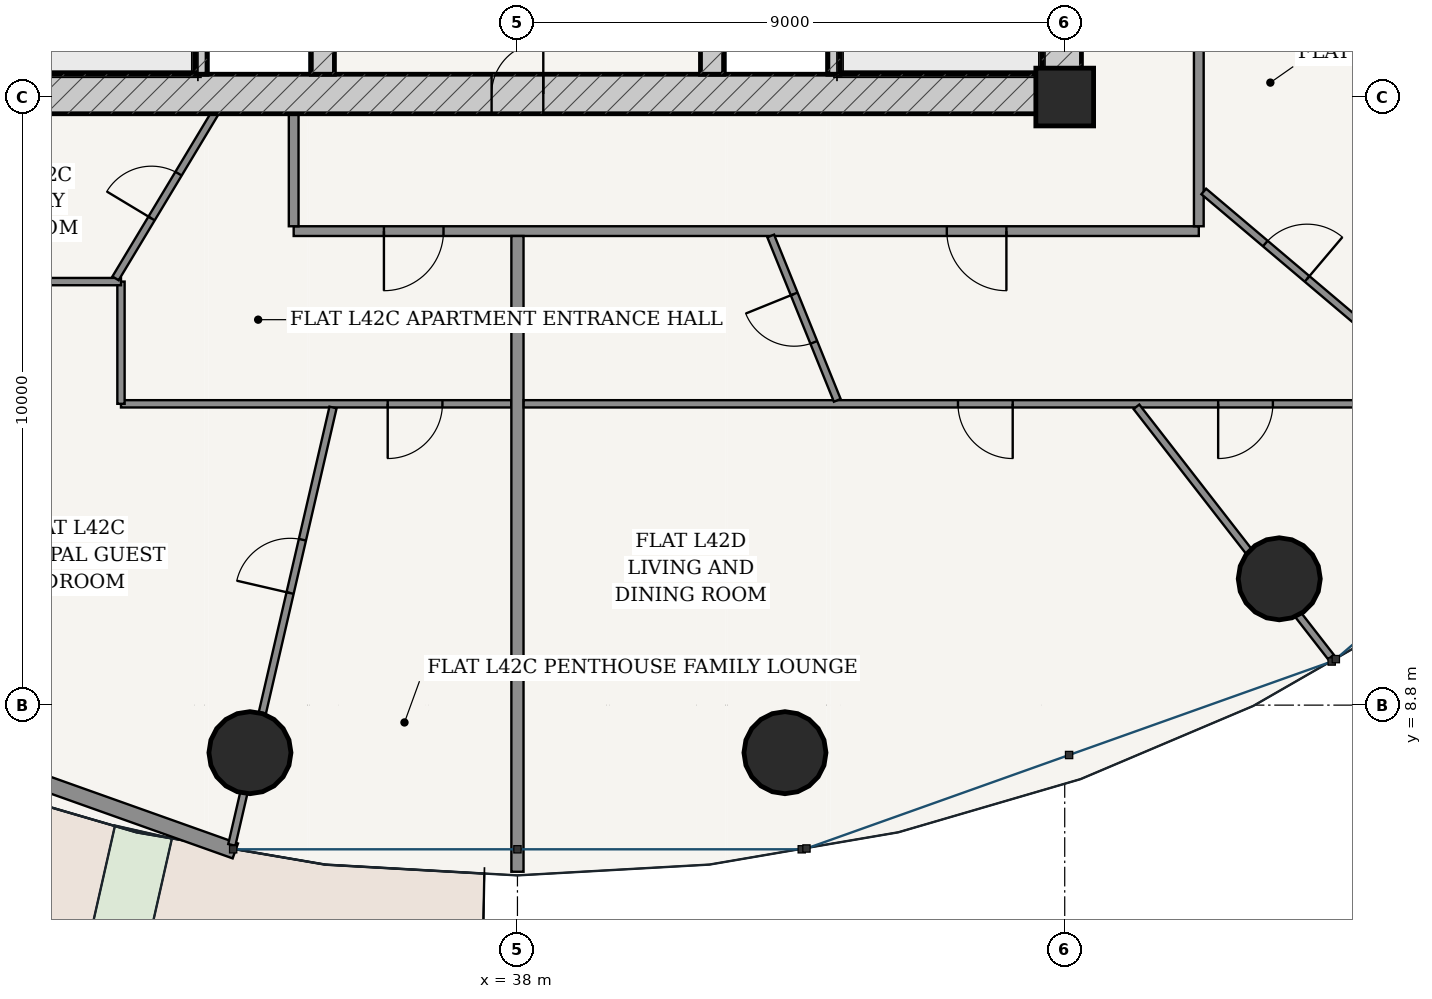
"""IFC4 building model, lengths in metres.
Left out: names, types, materials, properties, quantities, classifications, styles, units other than length and angle.
Written with IfcOpenShell. Run it as: python <this file> out.ifc"""

import sys

from ifc_helpers import new_model, si_unit, direction, frame, frame_2d, origin, origin_2d, place, context, subcontext, project, spatial, rectangle, hollow_circle, extrude, source, transform, mapped, element, fill, save


model = new_model("IFC4")
c1 = context("Model", 3, precision=1e-05, world=origin(), true_north=direction((-0.2419218956, 0.970295726276)))
c2 = subcontext(c1, "Body", "Model", "MODEL_VIEW")
j1 = project(units=[si_unit("LENGTHUNIT", "METRE"), si_unit("PLANEANGLEUNIT", "RADIAN")], contexts=[c1])
p1 = place(None, origin())
s1 = spatial("IfcSite", under=j1, at=p1, CompositionType="ELEMENT")
p2 = place(p1, origin())
s2 = spatial("IfcBuilding", under=s1, at=p2, CompositionType="ELEMENT")
p3 = place(p2, frame((0.0, 0.0, 160.6)))
s3 = spatial("IfcBuildingStorey", under=s2, at=p3, CompositionType="ELEMENT", Elevation=160.6)
p4 = place(p3, frame((47.0, 18.8, 0.0), z_axis=(0.0, 0.0, 1.0), x_axis=(1.0, 0.0, 0.0)))
e1 = element("IfcColumn", 1, at=p4, inside=s3, PredefinedType="COLUMN", context=c2, shape_type="SweptSolid", body=[
    extrude(rectangle(XDim=0.95, YDim=0.95, at=origin_2d()), origin(), (0.0, 0.0, 1.0), 3.6),
])
p5 = place(p3, frame((28.725, 18.85, 0.0), z_axis=(0.0, 0.0, 1.0), x_axis=(1.0, 0.0, 0.0)))
e2 = element("IfcWall", 2, at=p5, inside=s3, PredefinedType="SHEAR", context=c2, shape_type="SweptSolid", body=[
    extrude(rectangle(XDim=18.55, YDim=0.65, at=frame_2d((9.275, 0.0))), origin(), (0.0, 0.0, 1.0), 3.33),
])
p6 = place(p5, frame((8.85, 0.0, 0.0)))
e3 = element("IfcOpeningElement", 3, at=p6, cuts=e2, PredefinedType="OPENING", context=c2, shape_type="SweptSolid", body=[
    extrude(rectangle(XDim=0.85, YDim=2.1, at=frame_2d((0.425, 1.05))), frame((0.0, 0.335, 0.0), z_axis=(0.0, -1.0, 0.0), x_axis=(1.0, 0.0, 0.0)), (0.0, 0.0, 1.0), 0.67),
])
p7 = place(p3, frame((46.95, 19.175, 0.0), z_axis=(0.0, 0.0, 1.0), x_axis=(0.0, 1.0, 0.0)))
e4 = element("IfcWall", 4, at=p7, inside=s3, PredefinedType="SHEAR", context=c2, shape_type="SweptSolid", body=[
    extrude(rectangle(XDim=15.25, YDim=0.65, at=frame_2d((7.625, 0.0))), origin(), (0.0, 0.0, 1.0), 3.33),
])
p8 = place(p7, frame((9.875, 0.0, 0.0)))
e5 = element("IfcOpeningElement", 5, at=p8, cuts=e4, PredefinedType="OPENING", context=c2, shape_type="SweptSolid", body=[
    extrude(rectangle(XDim=1.5, YDim=2.2, at=frame_2d((0.75, 1.1))), frame((0.0, 0.335, 0.0), z_axis=(0.0, -1.0, 0.0), x_axis=(1.0, 0.0, 0.0)), (0.0, 0.0, 1.0), 0.67),
])
for number, where, z_axis, x_axis in (
    (6, (32.795, 19.175, 0.0), (0.0, 0.0, 1.0), (0.0, 1.0, 0.0)),
    (7, (43.205, 19.175, 0.0), (0.0, 0.0, 1.0), (0.0, 1.0, 0.0)),
):
    element("IfcWall", number, at=place(p3, frame(where, z_axis=z_axis, x_axis=x_axis)), inside=s3, PredefinedType="SOLIDWALL", context=c2, shape_type="SweptSolid", body=[
        extrude(rectangle(XDim=7.375, YDim=0.2, at=frame_2d((3.688, 0.0))), origin(), (0.0, 0.0, 1.0), 3.33),
    ])
p9 = place(p3, frame((34.8, 19.175, 0.0), z_axis=(0.0, 0.0, 1.0), x_axis=(0.0, 1.0, 0.0)))
e8 = element("IfcWall", 8, at=p9, inside=s3, PredefinedType="SHEAR", context=c2, shape_type="SweptSolid", body=[
    extrude(rectangle(XDim=15.25, YDim=0.38, at=frame_2d((7.625, 0.0))), origin(), (0.0, 0.0, 1.0), 3.33),
])
p10 = place(p9, frame((7.8, 0.0, 0.0)))
e9 = element("IfcOpeningElement", 9, at=p10, cuts=e8, PredefinedType="OPENING", context=c2, shape_type="SweptSolid", body=[
    extrude(rectangle(XDim=1.05, YDim=2.15, at=frame_2d((0.525, 1.075))), frame((0.0, 0.2, 0.0), z_axis=(0.0, -1.0, 0.0), x_axis=(1.0, 0.0, 0.0)), (0.0, 0.0, 1.0), 0.4),
])
p11 = place(p3, frame((41.2, 19.175, 0.0), z_axis=(0.0, 0.0, 1.0), x_axis=(0.0, 1.0, 0.0)))
e10 = element("IfcWall", 10, at=p11, inside=s3, PredefinedType="SHEAR", context=c2, shape_type="SweptSolid", body=[
    extrude(rectangle(XDim=15.25, YDim=0.38, at=frame_2d((7.625, 0.0))), origin(), (0.0, 0.0, 1.0), 3.33),
])
p12 = place(p11, frame((7.8, 0.0, 0.0)))
e11 = element("IfcOpeningElement", 11, at=p12, cuts=e10, PredefinedType="OPENING", context=c2, shape_type="SweptSolid", body=[
    extrude(rectangle(XDim=1.05, YDim=2.15, at=frame_2d((0.525, 1.075))), frame((0.0, 0.2, 0.0), z_axis=(0.0, -1.0, 0.0), x_axis=(1.0, 0.0, 0.0)), (0.0, 0.0, 1.0), 0.4),
])
for number, where, z_axis, x_axis in (
    (12, (33.601, 8.018, 0.0), (0.0, 0.0, 1.0), (1.0, 0.0, 0.0)),
    (13, (42.399, 8.018, 0.0), (0.0, 0.0, 1.0), (1.0, 0.0, 0.0)),
    (14, (50.528, 10.877, 0.0), (0.0, 0.0, 1.0), (1.0, 0.0, 0.0)),
):
    element("IfcColumn", number, at=place(p3, frame(where, z_axis=z_axis, x_axis=x_axis)), inside=s3, PredefinedType="COLUMN", context=c2, shape_type="SweptSolid", body=[
        extrude(hollow_circle(Radius=0.675, WallThickness=0.042, at=origin_2d()), origin(), (0.0, 0.0, 1.0), 3.6),
    ])
p13 = place(p3, frame((24.497, 9.557, 0.0), z_axis=(0.0, 0.0, 1.0), x_axis=(0.942103604331, -0.335321932934, 0.0)))
e15 = element("IfcWall", 15, at=p13, inside=s3, PredefinedType="SOLIDWALL", context=c2, shape_type="SweptSolid", body=[
    extrude(rectangle(XDim=9.408, YDim=0.26, at=frame_2d((4.704, 0.0))), origin(), (0.0, 0.0, 1.0), 3.33),
])
p14 = place(p13, frame((4.029, 0.0, 0.0)))
e16 = element("IfcOpeningElement", 16, at=p14, cuts=e15, PredefinedType="OPENING", context=c2, shape_type="SweptSolid", body=[
    extrude(rectangle(XDim=1.35, YDim=2.2, at=frame_2d((0.675, 1.1))), frame((0.0, 0.14, 0.0), z_axis=(0.0, -1.0, 0.0), x_axis=(1.0, 0.0, 0.0)), (0.0, 0.0, 1.0), 0.28),
])
p15 = place(p3, frame((34.32, 16.595, 0.0), z_axis=(0.0, 0.0, 1.0), x_axis=(1.0, 0.0, 0.0)))
e17 = element("IfcWall", 17, at=p15, inside=s3, PredefinedType="PARTITIONING", context=c2, shape_type="SweptSolid", body=[
    extrude(rectangle(XDim=14.885, YDim=0.16, at=frame_2d((7.442, 0.0))), origin(), (0.0, 0.0, 1.0), 2.776),
])
p16 = place(p15, frame((1.484, 0.0, 0.0)))
e18 = element("IfcOpeningElement", 18, at=p16, cuts=e17, PredefinedType="OPENING", context=c2, shape_type="SweptSolid", body=[
    extrude(rectangle(XDim=0.98, YDim=2.2, at=frame_2d((0.49, 1.1))), frame((0.0, 0.09, 0.0), z_axis=(0.0, -1.0, 0.0), x_axis=(1.0, 0.0, 0.0)), (0.0, 0.0, 1.0), 0.18),
])
p17 = place(p15, frame((10.741, 0.0, 0.0)))
e19 = element("IfcOpeningElement", 19, at=p17, cuts=e17, PredefinedType="OPENING", context=c2, shape_type="SweptSolid", body=[
    extrude(rectangle(XDim=0.98, YDim=2.2, at=frame_2d((0.49, 1.1))), frame((0.0, 0.09, 0.0), z_axis=(0.0, -1.0, 0.0), x_axis=(1.0, 0.0, 0.0)), (0.0, 0.0, 1.0), 0.18),
])
p18 = place(p3, frame((34.32, 16.675, 0.0), z_axis=(0.0, 0.0, 1.0), x_axis=(0.0, 1.0, 0.0)))
e20 = element("IfcWall", 20, at=p18, inside=s3, PredefinedType="PARTITIONING", context=c2, shape_type="SweptSolid", body=[
    extrude(rectangle(XDim=1.85, YDim=0.16, at=frame_2d((0.925, 0.0))), origin(), (0.0, 0.0, 1.0), 3.33),
])
p19 = place(p3, frame((49.205, 16.675, 0.0), z_axis=(0.0, 0.0, 1.0), x_axis=(0.0, 1.0, 0.0)))
e21 = element("IfcWall", 21, at=p19, inside=s3, PredefinedType="PARTITIONING", context=c2, shape_type="SweptSolid", body=[
    extrude(rectangle(XDim=18.4, YDim=0.16, at=frame_2d((9.2, 0.0))), origin(), (0.0, 0.0, 1.0), 2.776),
])
p20 = place(p19, frame((15.326, 0.0, 0.0)))
e22 = element("IfcOpeningElement", 22, at=p20, cuts=e21, PredefinedType="OPENING", context=c2, shape_type="SweptSolid", body=[
    extrude(rectangle(XDim=0.98, YDim=2.2, at=frame_2d((0.49, 1.1))), frame((0.0, 0.09, 0.0), z_axis=(0.0, -1.0, 0.0), x_axis=(1.0, 0.0, 0.0)), (0.0, 0.0, 1.0), 0.18),
])
p21 = place(p3, frame((37.898, 13.755, 0.0), z_axis=(0.0, 0.0, 1.0), x_axis=(-1.0, 0.0, 0.0)))
e23 = element("IfcWall", 23, at=p21, inside=s3, PredefinedType="PARTITIONING", context=c2, shape_type="SweptSolid", body=[
    extrude(rectangle(XDim=6.418, YDim=0.12, at=frame_2d((3.209, 0.0))), origin(), (0.0, 0.0, 1.0), 2.776),
])
p22 = place(p21, frame((1.132, 0.0, 0.0)))
e24 = element("IfcOpeningElement", 24, at=p22, cuts=e23, PredefinedType="OPENING", context=c2, shape_type="SweptSolid", body=[
    extrude(rectangle(XDim=0.9, YDim=2.15, at=frame_2d((0.45, 1.075))), frame((0.0, 0.07, 0.0), z_axis=(0.0, -1.0, 0.0), x_axis=(1.0, 0.0, 0.0)), (0.0, 0.0, 1.0), 0.14),
])
p23 = place(p3, frame((31.48, 13.755, 0.0), z_axis=(0.0, 0.0, 1.0), x_axis=(0.0, 1.0, 0.0)))
e25 = element("IfcWall", 25, at=p23, inside=s3, PredefinedType="PARTITIONING", context=c2, shape_type="SweptSolid", body=[
    extrude(rectangle(XDim=2.01, YDim=0.12, at=frame_2d((1.005, 0.0))), origin(), (0.0, 0.0, 1.0), 3.005),
])
p24 = place(p3, frame((31.48, 15.765, 0.0), z_axis=(0.0, 0.0, 1.0), x_axis=(-1.0, 0.0, 0.0)))
e26 = element("IfcWall", 26, at=p24, inside=s3, PredefinedType="PARTITIONING", context=c2, shape_type="SweptSolid", body=[
    extrude(rectangle(XDim=5.515, YDim=0.12, at=frame_2d((2.757, 0.0))), origin(), (0.0, 0.0, 1.0), 2.776),
])
p25 = place(p3, frame((34.967, 13.695, 0.0), z_axis=(0.0, 0.0, 1.0), x_axis=(-0.225458405801, -0.974252794327, 0.0)))
e27 = element("IfcWall", 27, at=p25, inside=s3, PredefinedType="PARTITIONING", context=c2, shape_type="SweptSolid", body=[
    extrude(rectangle(XDim=7.383, YDim=0.12, at=frame_2d((3.691, 0.0))), origin(), (0.0, 0.0, 1.0), 2.776),
])
p26 = place(p25, frame((2.232, 0.0, 0.0)))
e28 = element("IfcOpeningElement", 28, at=p26, cuts=e27, PredefinedType="OPENING", context=c2, shape_type="SweptSolid", body=[
    extrude(rectangle(XDim=0.9, YDim=2.15, at=frame_2d((0.45, 1.075))), frame((0.0, 0.07, 0.0), z_axis=(0.0, -1.0, 0.0), x_axis=(1.0, 0.0, 0.0)), (0.0, 0.0, 1.0), 0.14),
])
p27 = place(p3, frame((33.02, 18.525, 0.0), z_axis=(0.0, 0.0, 1.0), x_axis=(-0.515677168, -0.856782970421, 0.0)))
e29 = element("IfcWall", 29, at=p27, inside=s3, PredefinedType="PARTITIONING", context=c2, shape_type="SweptSolid", body=[
    extrude(rectangle(XDim=3.159, YDim=0.12, at=frame_2d((1.58, 0.0))), origin(), (0.0, 0.0, 1.0), 3.33),
])
p28 = place(p27, frame((1.15, 0.0, 0.0)))
e30 = element("IfcOpeningElement", 30, at=p28, cuts=e29, PredefinedType="OPENING", context=c2, shape_type="SweptSolid", body=[
    extrude(rectangle(XDim=0.86, YDim=2.15, at=frame_2d((0.43, 1.075))), frame((0.0, 0.07, 0.0), z_axis=(0.0, -1.0, 0.0), x_axis=(1.0, 0.0, 0.0)), (0.0, 0.0, 1.0), 0.14),
])
p29 = place(p3, frame((38.0, 16.515, 0.0), z_axis=(0.0, 0.0, 1.0), x_axis=(0.0, -1.0, 0.0)))
e31 = element("IfcWall", 31, at=p29, inside=s3, PredefinedType="PARTITIONING", context=c2, shape_type="SweptSolid", body=[
    extrude(rectangle(XDim=10.455, YDim=0.2, at=frame_2d((5.228, 0.0))), origin(), (0.0, 0.0, 1.0), 2.846),
])
p30 = place(p3, frame((52.045, 13.755, 0.0), z_axis=(0.0, 0.0, 1.0), x_axis=(-1.0, 0.0, 0.0)))
e32 = element("IfcWall", 32, at=p30, inside=s3, PredefinedType="PARTITIONING", context=c2, shape_type="SweptSolid", body=[
    extrude(rectangle(XDim=13.943, YDim=0.12, at=frame_2d((6.971, 0.0))), origin(), (0.0, 0.0, 1.0), 2.776),
])
p31 = place(p30, frame((5.9, 0.0, 0.0)))
e33 = element("IfcOpeningElement", 33, at=p31, cuts=e32, PredefinedType="OPENING", context=c2, shape_type="SweptSolid", body=[
    extrude(rectangle(XDim=0.9, YDim=2.15, at=frame_2d((0.45, 1.075))), frame((0.0, 0.07, 0.0), z_axis=(0.0, -1.0, 0.0), x_axis=(1.0, 0.0, 0.0)), (0.0, 0.0, 1.0), 0.14),
])
p32 = place(p30, frame((1.622, 0.0, 0.0)))
e34 = element("IfcOpeningElement", 34, at=p32, cuts=e32, PredefinedType="OPENING", context=c2, shape_type="SweptSolid", body=[
    extrude(rectangle(XDim=0.9, YDim=2.15, at=frame_2d((0.45, 1.075))), frame((0.0, 0.07, 0.0), z_axis=(0.0, -1.0, 0.0), x_axis=(1.0, 0.0, 0.0)), (0.0, 0.0, 1.0), 0.14),
])
p33 = place(p3, frame((48.179, 13.706, 0.0), z_axis=(0.0, 0.0, 1.0), x_axis=(0.613759011764, -0.789493429662, 0.0)))
e35 = element("IfcWall", 35, at=p33, inside=s3, PredefinedType="PARTITIONING", context=c2, shape_type="SweptSolid", body=[
    extrude(rectangle(XDim=5.212, YDim=0.12, at=frame_2d((2.606, 0.0))), origin(), (0.0, 0.0, 1.0), 2.776),
])
p34 = place(p3, frame((42.165, 16.515, 0.0), z_axis=(0.0, 0.0, 1.0), x_axis=(0.375386324206, -0.926868441365, 0.0)))
e36 = element("IfcWall", 36, at=p34, inside=s3, PredefinedType="PARTITIONING", context=c2, shape_type="SweptSolid", body=[
    extrude(rectangle(XDim=2.916, YDim=0.12, at=frame_2d((1.458, 0.0))), origin(), (0.0, 0.0, 1.0), 3.005),
])
p35 = place(p34, frame((1.028, 0.0, 0.0)))
e37 = element("IfcOpeningElement", 37, at=p35, cuts=e36, PredefinedType="OPENING", context=c2, shape_type="SweptSolid", body=[
    extrude(rectangle(XDim=0.86, YDim=2.15, at=frame_2d((0.43, 1.075))), frame((0.0, 0.07, 0.0), z_axis=(0.0, -1.0, 0.0), x_axis=(1.0, 0.0, 0.0)), (0.0, 0.0, 1.0), 0.14),
])
p36 = place(p3, frame((49.287, 17.248, 0.0), z_axis=(0.0, 0.0, 1.0), x_axis=(0.763274158734, -0.646074731443, 0.0)))
e38 = element("IfcWall", 38, at=p36, inside=s3, PredefinedType="PARTITIONING", context=c2, shape_type="SweptSolid", body=[
    extrude(rectangle(XDim=3.552, YDim=0.12, at=frame_2d((1.776, 0.0))), origin(), (0.0, 0.0, 1.0), 3.005),
])
p37 = place(p36, frame((1.326, 0.0, 0.0)))
e39 = element("IfcOpeningElement", 39, at=p37, cuts=e38, PredefinedType="OPENING", context=c2, shape_type="SweptSolid", body=[
    extrude(rectangle(XDim=0.9, YDim=2.15, at=frame_2d((0.45, 1.075))), frame((0.0, 0.07, 0.0), z_axis=(0.0, -1.0, 0.0), x_axis=(1.0, 0.0, 0.0)), (0.0, 0.0, 1.0), 0.14),
])
m1 = source(origin(), c2, "Body", "SweptSolid", [
    extrude(rectangle(XDim=0.85, YDim=2.1, at=frame_2d((0.425, 1.05))), frame((0.0, 0.025, 0.0), z_axis=(0.0, -1.0, 0.0), x_axis=(1.0, 0.0, 0.0)), (0.0, 0.0, 1.0), 0.05),
])
p38 = place(p6, origin())
e40 = element("IfcDoor", 40, at=p38, inside=s3, OperationType="SINGLE_SWING_RIGHT", PredefinedType="DOOR", context=c2, shape_type="MappedRepresentation", body=[
    mapped(m1, transform((0.0, 0.0, 0.0), scale=1.0)),
])
fill(e3, e40)
m2 = source(origin(), c2, "Body", "SweptSolid", [
    extrude(rectangle(XDim=0.98, YDim=2.2, at=frame_2d((0.49, 1.1))), frame((0.0, 0.025, 0.0), z_axis=(0.0, -1.0, 0.0), x_axis=(1.0, 0.0, 0.0)), (0.0, 0.0, 1.0), 0.05),
])
p39 = place(p16, frame((0.98, 0.0, 0.0), z_axis=(0.0, 0.0, 1.0), x_axis=(-1.0, 0.0, 0.0)))
e41 = element("IfcDoor", 41, at=p39, inside=s3, OperationType="SINGLE_SWING_RIGHT", PredefinedType="DOOR", context=c2, shape_type="MappedRepresentation", body=[
    mapped(m2, transform((0.0, 0.0, 0.0), scale=1.0)),
])
fill(e18, e41)
m3 = source(origin(), c2, "Body", "SweptSolid", [
    extrude(rectangle(XDim=0.86, YDim=2.15, at=frame_2d((0.43, 1.075))), frame((0.0, 0.025, 0.0), z_axis=(0.0, -1.0, 0.0), x_axis=(1.0, 0.0, 0.0)), (0.0, 0.0, 1.0), 0.05),
])
p40 = place(p28, frame((0.86, 0.0, 0.0), z_axis=(0.0, 0.0, 1.0), x_axis=(-1.0, 0.0, 0.0)))
e42 = element("IfcDoor", 42, at=p40, inside=s3, OperationType="SINGLE_SWING_LEFT", PredefinedType="DOOR", context=c2, shape_type="MappedRepresentation", body=[
    mapped(m3, transform((0.0, 0.0, 0.0), scale=1.0)),
])
fill(e30, e42)
m4 = source(origin(), c2, "Body", "SweptSolid", [
    extrude(rectangle(XDim=0.9, YDim=2.15, at=frame_2d((0.45, 1.075))), frame((0.0, 0.025, 0.0), z_axis=(0.0, -1.0, 0.0), x_axis=(1.0, 0.0, 0.0)), (0.0, 0.0, 1.0), 0.05),
])
p41 = place(p22, origin())
e43 = element("IfcDoor", 43, at=p41, inside=s3, OperationType="SINGLE_SWING_RIGHT", PredefinedType="DOOR", context=c2, shape_type="MappedRepresentation", body=[
    mapped(m4, transform((0.0, 0.0, 0.0), scale=1.0)),
])
fill(e24, e43)
p42 = place(p26, frame((0.9, 0.0, 0.0), z_axis=(0.0, 0.0, 1.0), x_axis=(-1.0, 0.0, 0.0)))
e44 = element("IfcDoor", 44, at=p42, inside=s3, OperationType="SINGLE_SWING_LEFT", PredefinedType="DOOR", context=c2, shape_type="MappedRepresentation", body=[
    mapped(m4, transform((0.0, 0.0, 0.0), scale=1.0)),
])
fill(e28, e44)
p43 = place(p17, frame((0.98, 0.0, 0.0), z_axis=(0.0, 0.0, 1.0), x_axis=(-1.0, 0.0, 0.0)))
e45 = element("IfcDoor", 45, at=p43, inside=s3, OperationType="SINGLE_SWING_LEFT", PredefinedType="DOOR", context=c2, shape_type="MappedRepresentation", body=[
    mapped(m2, transform((0.0, 0.0, 0.0), scale=1.0)),
])
fill(e19, e45)
p44 = place(p35, frame((0.86, 0.0, 0.0), z_axis=(0.0, 0.0, 1.0), x_axis=(-1.0, 0.0, 0.0)))
e46 = element("IfcDoor", 46, at=p44, inside=s3, OperationType="SINGLE_SWING_RIGHT", PredefinedType="DOOR", context=c2, shape_type="MappedRepresentation", body=[
    mapped(m3, transform((0.0, 0.0, 0.0), scale=1.0)),
])
fill(e37, e46)
p45 = place(p31, origin())
e47 = element("IfcDoor", 47, at=p45, inside=s3, OperationType="SINGLE_SWING_LEFT", PredefinedType="DOOR", context=c2, shape_type="MappedRepresentation", body=[
    mapped(m4, transform((0.0, 0.0, 0.0), scale=1.0)),
])
fill(e33, e47)
p46 = place(p37, origin())
e48 = element("IfcDoor", 48, at=p46, inside=s3, OperationType="SINGLE_SWING_RIGHT", PredefinedType="DOOR", context=c2, shape_type="MappedRepresentation", body=[
    mapped(m4, transform((0.0, 0.0, 0.0), scale=1.0)),
])
fill(e39, e48)
p47 = place(p32, origin())
e49 = element("IfcDoor", 49, at=p47, inside=s3, OperationType="SINGLE_SWING_RIGHT", PredefinedType="DOOR", context=c2, shape_type="MappedRepresentation", body=[
    mapped(m4, transform((0.0, 0.0, 0.0), scale=1.0)),
])
fill(e34, e49)
save(model, sys.argv[1])
